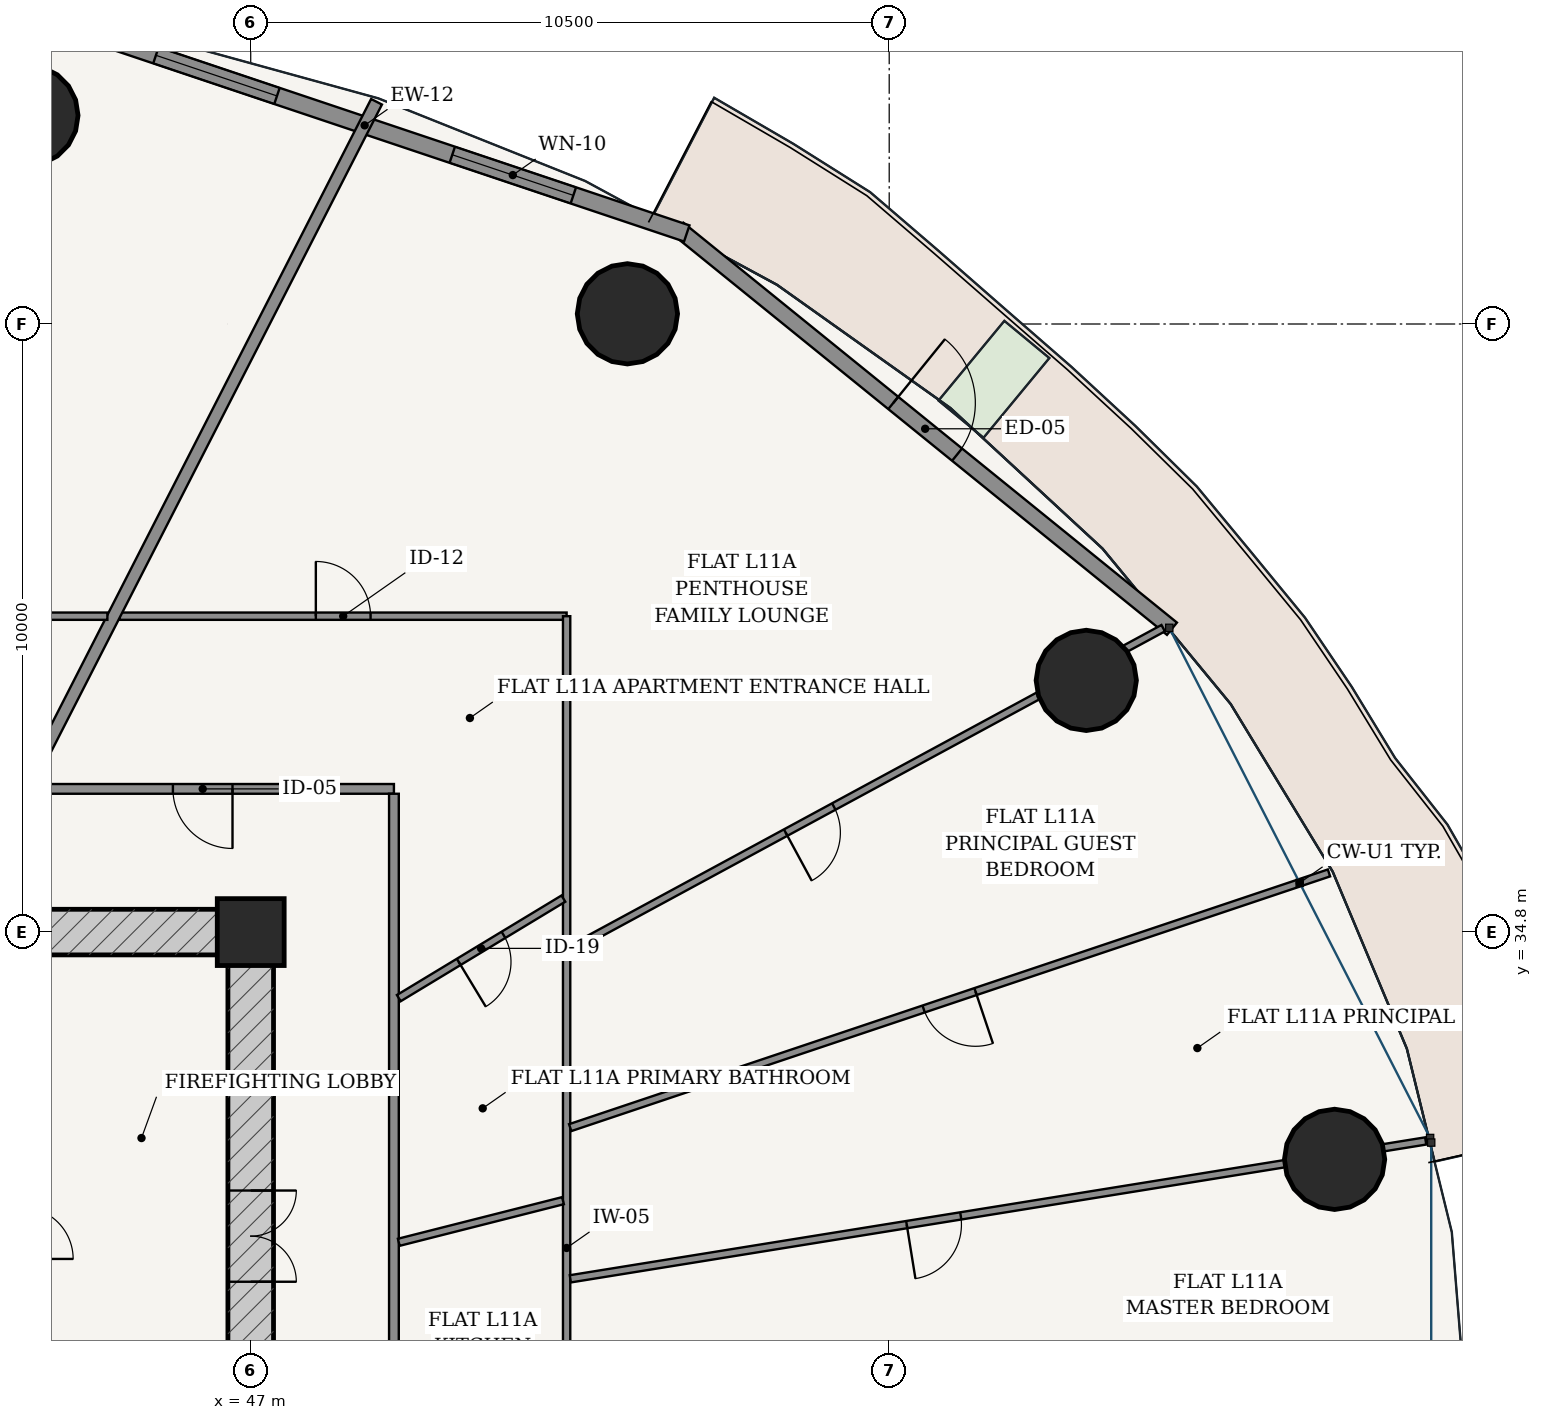
"""IFC4 building model, lengths in metres.
Left out: names, types, materials, properties, quantities, classifications, styles, units other than length and angle.
Written with IfcOpenShell. Run it as: python <this file> out.ifc"""

import sys

from ifc_helpers import new_model, si_unit, direction, frame, frame_2d, origin, origin_2d, place, context, subcontext, project, spatial, rectangle, hollow_circle, extrude, source, transform, mapped, element, fill, save


model = new_model("IFC4")
c1 = context("Model", 3, precision=1e-05, world=origin(), true_north=direction((-0.2419218956, 0.970295726276)))
c2 = subcontext(c1, "Body", "Model", "MODEL_VIEW")
j1 = project(units=[si_unit("LENGTHUNIT", "METRE"), si_unit("PLANEANGLEUNIT", "RADIAN")], contexts=[c1])
p1 = place(None, origin())
s1 = spatial("IfcSite", under=j1, at=p1, CompositionType="ELEMENT")
p2 = place(p1, origin())
s2 = spatial("IfcBuilding", under=s1, at=p2, CompositionType="ELEMENT")
p3 = place(p2, frame((0.0, 0.0, 45.6)))
s3 = spatial("IfcBuildingStorey", under=s2, at=p3, CompositionType="ELEMENT", Elevation=45.6)
p4 = place(p3, frame((47.0, 34.8, 0.0), z_axis=(0.0, 0.0, 1.0), x_axis=(1.0, 0.0, 0.0)))
e1 = element("IfcColumn", 1, at=p4, inside=s3, PredefinedType="COLUMN", context=c2, shape_type="SweptSolid", body=[
    extrude(rectangle(XDim=1.1, YDim=1.1, at=origin_2d()), origin(), (0.0, 0.0, 1.0), 3.6),
])
p5 = place(p3, frame((28.625, 34.8, 0.0), z_axis=(0.0, 0.0, 1.0), x_axis=(1.0, 0.0, 0.0)))
e2 = element("IfcWall", 2, at=p5, inside=s3, PredefinedType="SHEAR", context=c2, shape_type="SweptSolid", body=[
    extrude(rectangle(XDim=18.75, YDim=0.75, at=frame_2d((9.375, 0.0))), origin(), (0.0, 0.0, 1.0), 3.32),
])
p6 = place(p5, frame((6.887, 0.0, 0.0)))
e3 = element("IfcOpeningElement", 3, at=p6, cuts=e2, PredefinedType="OPENING", context=c2, shape_type="SweptSolid", body=[
    extrude(rectangle(XDim=0.85, YDim=2.1, at=frame_2d((0.425, 1.05))), frame((0.0, 0.385, 0.0), z_axis=(0.0, -1.0, 0.0), x_axis=(1.0, 0.0, 0.0)), (0.0, 0.0, 1.0), 0.77),
])
p7 = place(p5, frame((8.945, 0.0, 0.0)))
e4 = element("IfcOpeningElement", 4, at=p7, cuts=e2, PredefinedType="OPENING", context=c2, shape_type="SweptSolid", body=[
    extrude(rectangle(XDim=0.86, YDim=2.1, at=frame_2d((0.43, 1.05))), frame((0.0, 0.385, 0.0), z_axis=(0.0, -1.0, 0.0), x_axis=(1.0, 0.0, 0.0)), (0.0, 0.0, 1.0), 0.77),
])
p8 = place(p5, frame((11.012, 0.0, 0.0)))
e5 = element("IfcOpeningElement", 5, at=p8, cuts=e2, PredefinedType="OPENING", context=c2, shape_type="SweptSolid", body=[
    extrude(rectangle(XDim=0.85, YDim=2.1, at=frame_2d((0.425, 1.05))), frame((0.0, 0.385, 0.0), z_axis=(0.0, -1.0, 0.0), x_axis=(1.0, 0.0, 0.0)), (0.0, 0.0, 1.0), 0.77),
])
p9 = place(p3, frame((47.0, 19.175, 0.0), z_axis=(0.0, 0.0, 1.0), x_axis=(0.0, 1.0, 0.0)))
e6 = element("IfcWall", 6, at=p9, inside=s3, PredefinedType="SHEAR", context=c2, shape_type="SweptSolid", body=[
    extrude(rectangle(XDim=15.25, YDim=0.75, at=frame_2d((7.625, 0.0))), origin(), (0.0, 0.0, 1.0), 3.32),
])
p10 = place(p9, frame((9.875, 0.0, 0.0)))
e7 = element("IfcOpeningElement", 7, at=p10, cuts=e6, PredefinedType="OPENING", context=c2, shape_type="SweptSolid", body=[
    extrude(rectangle(XDim=1.5, YDim=2.2, at=frame_2d((0.75, 1.1))), frame((0.0, 0.385, 0.0), z_axis=(0.0, -1.0, 0.0), x_axis=(1.0, 0.0, 0.0)), (0.0, 0.0, 1.0), 0.77),
])
for number, where, z_axis, x_axis in (
    (8, (64.824, 31.063, 0.0), (0.0, 0.0, 1.0), (1.0, 0.0, 0.0)),
    (9, (60.741, 38.939, 0.0), (0.0, 0.0, 1.0), (1.0, 0.0, 0.0)),
    (10, (53.195, 44.968, 0.0), (0.0, 0.0, 1.0), (1.0, 0.0, 0.0)),
    (11, (43.336, 48.23, 0.0), (0.0, 0.0, 1.0), (1.0, 0.0, 0.0)),
):
    element("IfcColumn", number, at=place(p3, frame(where, z_axis=z_axis, x_axis=x_axis)), inside=s3, PredefinedType="COLUMN", context=c2, shape_type="SweptSolid", body=[
        extrude(hollow_circle(Radius=0.825, WallThickness=0.05, at=origin_2d()), origin(), (0.0, 0.0, 1.0), 3.6),
    ])
p11 = place(p3, frame((62.15, 39.789, 0.0), z_axis=(0.0, 0.0, 1.0), x_axis=(-0.777005352078, 0.62949398952, 0.0)))
e12 = element("IfcWall", 12, at=p11, inside=s3, PredefinedType="SOLIDWALL", context=c2, shape_type="SweptSolid", body=[
    extrude(rectangle(XDim=10.447, YDim=0.26, at=frame_2d((5.223, 0.0))), origin(), (0.0, 0.0, 1.0), 3.32),
])
p12 = place(p11, frame((4.548, 0.0, 0.0)))
e13 = element("IfcOpeningElement", 13, at=p12, cuts=e12, PredefinedType="OPENING", context=c2, shape_type="SweptSolid", body=[
    extrude(rectangle(XDim=1.35, YDim=2.2, at=frame_2d((0.675, 1.1))), frame((0.0, 0.14, 0.0), z_axis=(0.0, -1.0, 0.0), x_axis=(1.0, 0.0, 0.0)), (0.0, 0.0, 1.0), 0.28),
])
p13 = place(p3, frame((54.171, 46.289, 0.0), z_axis=(0.0, 0.0, 1.0), x_axis=(-0.948041258496, 0.318147406385, 0.0)))
e14 = element("IfcWall", 14, at=p13, inside=s3, PredefinedType="SOLIDWALL", context=c2, shape_type="SweptSolid", body=[
    extrude(rectangle(XDim=11.175, YDim=0.28, at=frame_2d((5.588, 0.0))), origin(), (0.0, 0.0, 1.0), 3.32),
])
p14 = place(p13, frame((1.967, 0.0, 0.85)))
e15 = element("IfcOpeningElement", 15, at=p14, cuts=e14, PredefinedType="OPENING", context=c2, shape_type="SweptSolid", body=[
    extrude(rectangle(XDim=2.1, YDim=1.95, at=frame_2d((1.05, 0.975))), frame((0.0, 0.15, 0.0), z_axis=(0.0, -1.0, 0.0), x_axis=(1.0, 0.0, 0.0)), (0.0, 0.0, 1.0), 0.3),
])
p15 = place(p13, frame((7.108, 0.0, 0.85)))
e16 = element("IfcOpeningElement", 16, at=p15, cuts=e14, PredefinedType="OPENING", context=c2, shape_type="SweptSolid", body=[
    extrude(rectangle(XDim=2.1, YDim=1.95, at=frame_2d((1.05, 0.975))), frame((0.0, 0.15, 0.0), z_axis=(0.0, -1.0, 0.0), x_axis=(1.0, 0.0, 0.0)), (0.0, 0.0, 1.0), 0.3),
])
p16 = place(p3, frame((26.645, 37.155, 0.0), z_axis=(0.0, 0.0, 1.0), x_axis=(1.0, 0.0, 0.0)))
e17 = element("IfcWall", 17, at=p16, inside=s3, PredefinedType="PARTITIONING", context=c2, shape_type="SweptSolid", body=[
    extrude(rectangle(XDim=22.71, YDim=0.16, at=frame_2d((11.355, 0.0))), origin(), (0.0, 0.0, 1.0), 2.688),
])
p17 = place(p16, frame((19.075, 0.0, 0.0)))
e18 = element("IfcOpeningElement", 18, at=p17, cuts=e17, PredefinedType="OPENING", context=c2, shape_type="SweptSolid", body=[
    extrude(rectangle(XDim=0.98, YDim=2.2, at=frame_2d((0.49, 1.1))), frame((0.0, 0.09, 0.0), z_axis=(0.0, -1.0, 0.0), x_axis=(1.0, 0.0, 0.0)), (0.0, 0.0, 1.0), 0.18),
])
p18 = place(p16, frame((6.221, 0.0, 0.0)))
e19 = element("IfcOpeningElement", 19, at=p18, cuts=e17, PredefinedType="OPENING", context=c2, shape_type="SweptSolid", body=[
    extrude(rectangle(XDim=0.98, YDim=2.2, at=frame_2d((0.49, 1.1))), frame((0.0, 0.09, 0.0), z_axis=(0.0, -1.0, 0.0), x_axis=(1.0, 0.0, 0.0)), (0.0, 0.0, 1.0), 0.18),
])
p19 = place(p3, frame((49.355, 16.525, 0.0), z_axis=(0.0, 0.0, 1.0), x_axis=(0.0, 1.0, 0.0)))
e20 = element("IfcWall", 20, at=p19, inside=s3, PredefinedType="PARTITIONING", context=c2, shape_type="SweptSolid", body=[
    extrude(rectangle(XDim=20.55, YDim=0.16, at=frame_2d((10.275, 0.0))), origin(), (0.0, 0.0, 1.0), 2.688),
])
p20 = place(p3, frame((44.847, 39.995, 0.0), z_axis=(0.0, 0.0, 1.0), x_axis=(1.0, 0.0, 0.0)))
e21 = element("IfcWall", 21, at=p20, inside=s3, PredefinedType="PARTITIONING", context=c2, shape_type="SweptSolid", body=[
    extrude(rectangle(XDim=7.348, YDim=0.12, at=frame_2d((3.674, 0.0))), origin(), (0.0, 0.0, 1.0), 2.688),
])
p21 = place(p20, frame((3.224, 0.0, 0.0)))
e22 = element("IfcOpeningElement", 22, at=p21, cuts=e21, PredefinedType="OPENING", context=c2, shape_type="SweptSolid", body=[
    extrude(rectangle(XDim=0.9, YDim=2.15, at=frame_2d((0.45, 1.075))), frame((0.0, 0.07, 0.0), z_axis=(0.0, -1.0, 0.0), x_axis=(1.0, 0.0, 0.0)), (0.0, 0.0, 1.0), 0.14),
])
p22 = place(p3, frame((52.195, 39.995, 0.0), z_axis=(0.0, 0.0, 1.0), x_axis=(0.0, -1.0, 0.0)))
e23 = element("IfcWall", 23, at=p22, inside=s3, PredefinedType="PARTITIONING", context=c2, shape_type="SweptSolid", body=[
    extrude(rectangle(XDim=20.779, YDim=0.12, at=frame_2d((10.39, 0.0))), origin(), (0.0, 0.0, 1.0), 2.688),
])
p23 = place(p22, frame((13.944, 0.0, 0.0)))
e24 = element("IfcOpeningElement", 24, at=p23, cuts=e23, PredefinedType="OPENING", context=c2, shape_type="SweptSolid", body=[
    extrude(rectangle(XDim=0.9, YDim=2.15, at=frame_2d((0.45, 1.075))), frame((0.0, 0.07, 0.0), z_axis=(0.0, -1.0, 0.0), x_axis=(1.0, 0.0, 0.0)), (0.0, 0.0, 1.0), 0.14),
])
p24 = place(p22, frame((17.655, 0.0, 0.0)))
e25 = element("IfcOpeningElement", 25, at=p24, cuts=e23, PredefinedType="OPENING", context=c2, shape_type="SweptSolid", body=[
    extrude(rectangle(XDim=0.9, YDim=2.15, at=frame_2d((0.45, 1.075))), frame((0.0, 0.07, 0.0), z_axis=(0.0, -1.0, 0.0), x_axis=(1.0, 0.0, 0.0)), (0.0, 0.0, 1.0), 0.14),
])
p25 = place(p3, frame((52.256, 29.098, 0.0), z_axis=(0.0, 0.0, 1.0), x_axis=(0.987257017041, 0.159133850272, 0.0)))
e26 = element("IfcWall", 26, at=p25, inside=s3, PredefinedType="PARTITIONING", context=c2, shape_type="SweptSolid", body=[
    extrude(rectangle(XDim=14.248, YDim=0.12, at=frame_2d((7.124, 0.0))), origin(), (0.0, 0.0, 1.0), 2.688),
])
p26 = place(p25, frame((5.603, 0.0, 0.0)))
e27 = element("IfcOpeningElement", 27, at=p26, cuts=e26, PredefinedType="OPENING", context=c2, shape_type="SweptSolid", body=[
    extrude(rectangle(XDim=0.9, YDim=2.15, at=frame_2d((0.45, 1.075))), frame((0.0, 0.07, 0.0), z_axis=(0.0, -1.0, 0.0), x_axis=(1.0, 0.0, 0.0)), (0.0, 0.0, 1.0), 0.14),
])
p27 = place(p3, frame((52.254, 31.584, 0.0), z_axis=(0.0, 0.0, 1.0), x_axis=(0.948022802246, 0.318202398516, 0.0)))
e28 = element("IfcWall", 28, at=p27, inside=s3, PredefinedType="PARTITIONING", context=c2, shape_type="SweptSolid", body=[
    extrude(rectangle(XDim=13.163, YDim=0.12, at=frame_2d((6.582, 0.0))), origin(), (0.0, 0.0, 1.0), 2.762),
])
p28 = place(p27, frame((6.131, 0.0, 0.0)))
e29 = element("IfcOpeningElement", 29, at=p28, cuts=e28, PredefinedType="OPENING", context=c2, shape_type="SweptSolid", body=[
    extrude(rectangle(XDim=0.9, YDim=2.15, at=frame_2d((0.45, 1.075))), frame((0.0, 0.07, 0.0), z_axis=(0.0, -1.0, 0.0), x_axis=(1.0, 0.0, 0.0)), (0.0, 0.0, 1.0), 0.14),
])
p29 = place(p3, frame((52.25, 34.515, 0.0), z_axis=(0.0, 0.0, 1.0), x_axis=(0.879370672984, 0.476137815654, 0.0)))
e30 = element("IfcWall", 30, at=p29, inside=s3, PredefinedType="PARTITIONING", context=c2, shape_type="SweptSolid", body=[
    extrude(rectangle(XDim=11.094, YDim=0.12, at=frame_2d((5.547, 0.0))), origin(), (0.0, 0.0, 1.0), 2.688),
])
p30 = place(p29, frame((4.034, 0.0, 0.0)))
e31 = element("IfcOpeningElement", 31, at=p30, cuts=e30, PredefinedType="OPENING", context=c2, shape_type="SweptSolid", body=[
    extrude(rectangle(XDim=0.9, YDim=2.15, at=frame_2d((0.45, 1.075))), frame((0.0, 0.07, 0.0), z_axis=(0.0, -1.0, 0.0), x_axis=(1.0, 0.0, 0.0)), (0.0, 0.0, 1.0), 0.14),
])
p31 = place(p3, frame((49.435, 29.699, 0.0), z_axis=(0.0, 0.0, 1.0), x_axis=(0.969327617988, 0.245772189243, 0.0)))
e32 = element("IfcWall", 32, at=p31, inside=s3, PredefinedType="PARTITIONING", context=c2, shape_type="SweptSolid", body=[
    extrude(rectangle(XDim=2.785, YDim=0.12, at=frame_2d((1.393, 0.0))), origin(), (0.0, 0.0, 1.0), 3.32),
])
p32 = place(p3, frame((49.435, 33.714, 0.0), z_axis=(0.0, 0.0, 1.0), x_axis=(0.855724035959, 0.517432482824, 0.0)))
e33 = element("IfcWall", 33, at=p32, inside=s3, PredefinedType="PARTITIONING", context=c2, shape_type="SweptSolid", body=[
    extrude(rectangle(XDim=3.163, YDim=0.12, at=frame_2d((1.582, 0.0))), origin(), (0.0, 0.0, 1.0), 3.32),
])
p33 = place(p32, frame((1.152, 0.0, 0.0)))
e34 = element("IfcOpeningElement", 34, at=p33, cuts=e33, PredefinedType="OPENING", context=c2, shape_type="SweptSolid", body=[
    extrude(rectangle(XDim=0.86, YDim=2.15, at=frame_2d((0.43, 1.075))), frame((0.0, 0.07, 0.0), z_axis=(0.0, -1.0, 0.0), x_axis=(1.0, 0.0, 0.0)), (0.0, 0.0, 1.0), 0.14),
])
p34 = place(p3, frame((43.335, 37.237, 0.0), z_axis=(0.0, 0.0, 1.0), x_axis=(0.455148959499, 0.890415310216, 0.0)))
e35 = element("IfcWall", 35, at=p34, inside=s3, PredefinedType="PARTITIONING", context=c2, shape_type="SweptSolid", body=[
    extrude(rectangle(XDim=12.598, YDim=0.2, at=frame_2d((6.299, 0.0))), origin(), (0.0, 0.0, 1.0), 2.762),
])
p35 = place(p3, frame((23.805, 39.995, 0.0), z_axis=(0.0, 0.0, 1.0), x_axis=(1.0, 0.0, 0.0)))
e36 = element("IfcWall", 36, at=p35, inside=s3, PredefinedType="PARTITIONING", context=c2, shape_type="SweptSolid", body=[
    extrude(rectangle(XDim=20.838, YDim=0.12, at=frame_2d((10.419, 0.0))), origin(), (0.0, 0.0, 1.0), 2.688),
])
p36 = place(p35, frame((11.931, 0.0, 0.0)))
e37 = element("IfcOpeningElement", 37, at=p36, cuts=e36, PredefinedType="OPENING", context=c2, shape_type="SweptSolid", body=[
    extrude(rectangle(XDim=0.9, YDim=2.15, at=frame_2d((0.45, 1.075))), frame((0.0, 0.07, 0.0), z_axis=(0.0, -1.0, 0.0), x_axis=(1.0, 0.0, 0.0)), (0.0, 0.0, 1.0), 0.14),
])
m1 = source(origin(), c2, "Body", "SweptSolid", [
    extrude(rectangle(XDim=1.35, YDim=2.2, at=frame_2d((0.675, 1.1))), frame((0.0, 0.025, 0.0), z_axis=(0.0, -1.0, 0.0), x_axis=(1.0, 0.0, 0.0)), (0.0, 0.0, 1.0), 0.05),
])
p37 = place(p12, frame((1.35, 0.0, 0.0), z_axis=(0.0, 0.0, 1.0), x_axis=(-1.0, 0.0, 0.0)))
e38 = element("IfcDoor", 38, at=p37, inside=s3, OperationType="SINGLE_SWING_LEFT", PredefinedType="DOOR", context=c2, shape_type="MappedRepresentation", body=[
    mapped(m1, transform((0.0, 0.0, 0.0), scale=1.0)),
])
fill(e13, e38)
m2 = source(origin(), c2, "Body", "SweptSolid", [
    extrude(rectangle(XDim=2.1, YDim=1.95, at=frame_2d((1.05, 0.975))), frame((0.0, 0.03, 0.0), z_axis=(0.0, -1.0, 0.0), x_axis=(1.0, 0.0, 0.0)), (0.0, 0.0, 1.0), 0.06),
])
p38 = place(p14, origin())
e39 = element("IfcWindow", 39, at=p38, inside=s3, PartitioningType="SINGLE_PANEL", PredefinedType="WINDOW", context=c2, shape_type="MappedRepresentation", body=[
    mapped(m2, transform((0.0, 0.0, 0.0), scale=1.0)),
])
fill(e15, e39)
p39 = place(p15, origin())
e40 = element("IfcWindow", 40, at=p39, inside=s3, PartitioningType="SINGLE_PANEL", PredefinedType="WINDOW", context=c2, shape_type="MappedRepresentation", body=[
    mapped(m2, transform((0.0, 0.0, 0.0), scale=1.0)),
])
fill(e16, e40)
m3 = source(origin(), c2, "Body", "SweptSolid", [
    extrude(rectangle(XDim=1.5, YDim=2.2, at=frame_2d((0.75, 1.1))), frame((0.0, 0.025, 0.0), z_axis=(0.0, -1.0, 0.0), x_axis=(1.0, 0.0, 0.0)), (0.0, 0.0, 1.0), 0.05),
])
p40 = place(p10, frame((1.5, 0.0, 0.0), z_axis=(0.0, 0.0, 1.0), x_axis=(-1.0, 0.0, 0.0)))
e41 = element("IfcDoor", 41, at=p40, inside=s3, OperationType="DOUBLE_DOOR_SINGLE_SWING", PredefinedType="DOOR", context=c2, shape_type="MappedRepresentation", body=[
    mapped(m3, transform((0.0, 0.0, 0.0), scale=1.0)),
])
fill(e7, e41)
m4 = source(origin(), c2, "Body", "SweptSolid", [
    extrude(rectangle(XDim=0.98, YDim=2.2, at=frame_2d((0.49, 1.1))), frame((0.0, 0.025, 0.0), z_axis=(0.0, -1.0, 0.0), x_axis=(1.0, 0.0, 0.0)), (0.0, 0.0, 1.0), 0.05),
])
p41 = place(p17, frame((0.98, 0.0, 0.0), z_axis=(0.0, 0.0, 1.0), x_axis=(-1.0, 0.0, 0.0)))
e42 = element("IfcDoor", 42, at=p41, inside=s3, OperationType="SINGLE_SWING_LEFT", PredefinedType="DOOR", context=c2, shape_type="MappedRepresentation", body=[
    mapped(m4, transform((0.0, 0.0, 0.0), scale=1.0)),
])
fill(e18, e42)
m5 = source(origin(), c2, "Body", "SweptSolid", [
    extrude(rectangle(XDim=0.86, YDim=2.15, at=frame_2d((0.43, 1.075))), frame((0.0, 0.025, 0.0), z_axis=(0.0, -1.0, 0.0), x_axis=(1.0, 0.0, 0.0)), (0.0, 0.0, 1.0), 0.05),
])
p42 = place(p33, frame((0.86, 0.0, 0.0), z_axis=(0.0, 0.0, 1.0), x_axis=(-1.0, 0.0, 0.0)))
e43 = element("IfcDoor", 43, at=p42, inside=s3, OperationType="SINGLE_SWING_RIGHT", PredefinedType="DOOR", context=c2, shape_type="MappedRepresentation", body=[
    mapped(m5, transform((0.0, 0.0, 0.0), scale=1.0)),
])
fill(e34, e43)
m6 = source(origin(), c2, "Body", "SweptSolid", [
    extrude(rectangle(XDim=0.9, YDim=2.15, at=frame_2d((0.45, 1.075))), frame((0.0, 0.025, 0.0), z_axis=(0.0, -1.0, 0.0), x_axis=(1.0, 0.0, 0.0)), (0.0, 0.0, 1.0), 0.05),
])
p43 = place(p21, origin())
e44 = element("IfcDoor", 44, at=p43, inside=s3, OperationType="SINGLE_SWING_LEFT", PredefinedType="DOOR", context=c2, shape_type="MappedRepresentation", body=[
    mapped(m6, transform((0.0, 0.0, 0.0), scale=1.0)),
])
fill(e22, e44)
p44 = place(p30, frame((0.9, 0.0, 0.0), z_axis=(0.0, 0.0, 1.0), x_axis=(-1.0, 0.0, 0.0)))
e45 = element("IfcDoor", 45, at=p44, inside=s3, OperationType="SINGLE_SWING_RIGHT", PredefinedType="DOOR", context=c2, shape_type="MappedRepresentation", body=[
    mapped(m6, transform((0.0, 0.0, 0.0), scale=1.0)),
])
fill(e31, e45)
p45 = place(p28, frame((0.9, 0.0, 0.0), z_axis=(0.0, 0.0, 1.0), x_axis=(-1.0, 0.0, 0.0)))
e46 = element("IfcDoor", 46, at=p45, inside=s3, OperationType="SINGLE_SWING_LEFT", PredefinedType="DOOR", context=c2, shape_type="MappedRepresentation", body=[
    mapped(m6, transform((0.0, 0.0, 0.0), scale=1.0)),
])
fill(e29, e46)
p46 = place(p26, frame((0.9, 0.0, 0.0), z_axis=(0.0, 0.0, 1.0), x_axis=(-1.0, 0.0, 0.0)))
e47 = element("IfcDoor", 47, at=p46, inside=s3, OperationType="SINGLE_SWING_RIGHT", PredefinedType="DOOR", context=c2, shape_type="MappedRepresentation", body=[
    mapped(m6, transform((0.0, 0.0, 0.0), scale=1.0)),
])
fill(e27, e47)
save(model, sys.argv[1])
